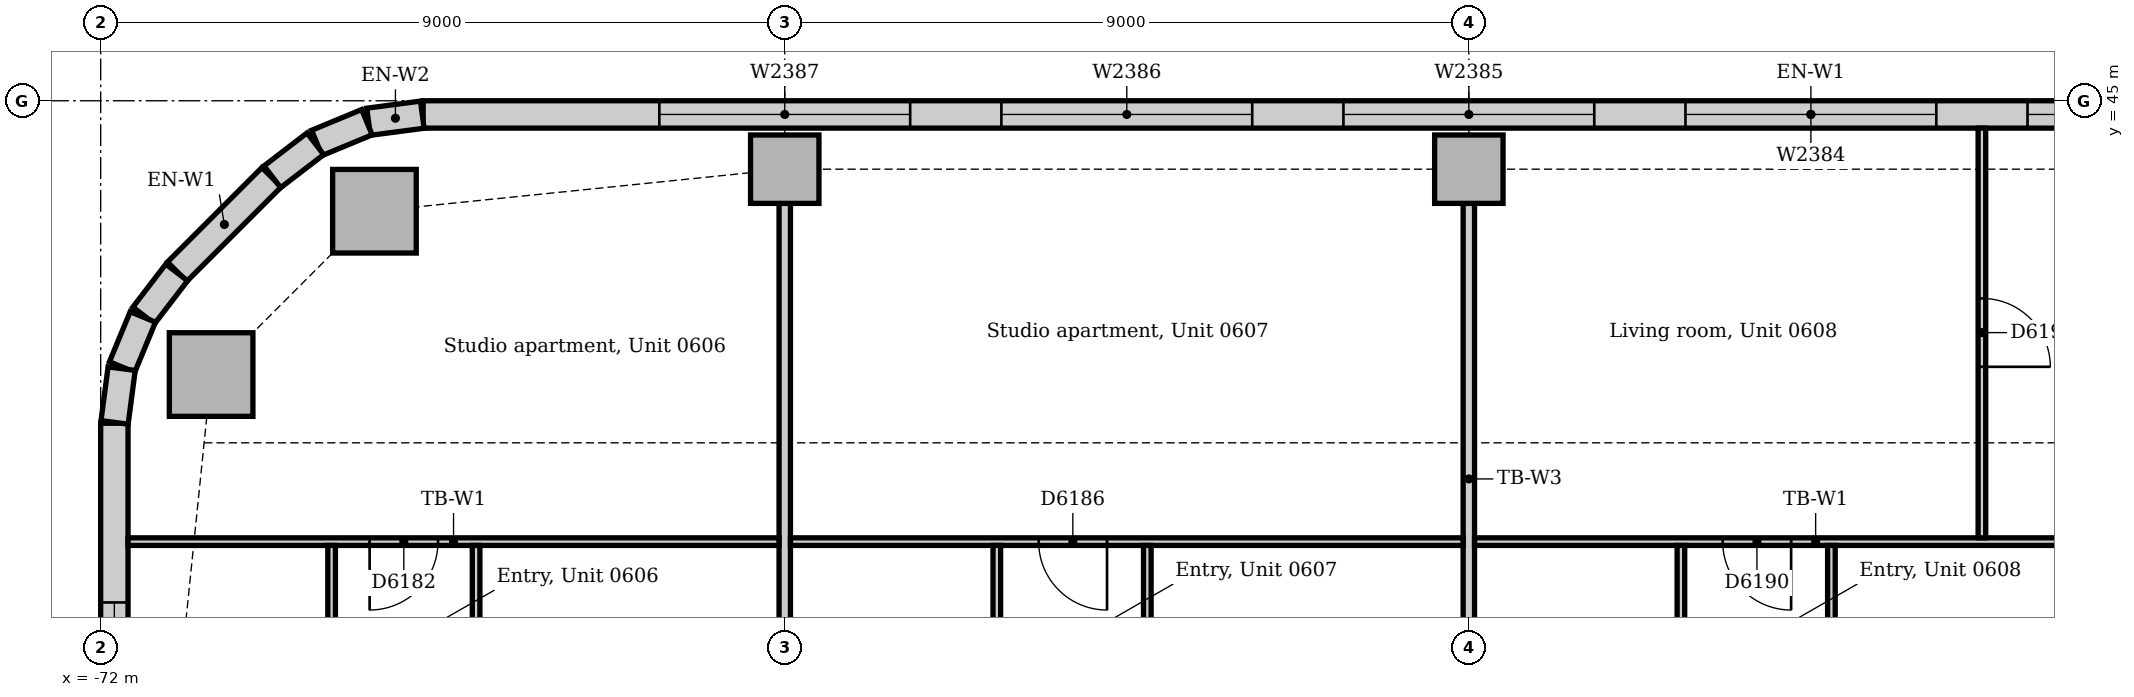
"""IFC4 building model, lengths in metres.
Left out: names, types, materials, properties, quantities, classifications, styles, units other than length and angle.
Written with IfcOpenShell. Run it as: python <this file> out.ifc"""

import sys

from ifc_helpers import new_model, si_unit, direction, frame, frame_2d, origin, origin_2d, place, context, subcontext, project, spatial, rectangle, extrude, element, fill, save


model = new_model("IFC4")
c1 = context("Model", 3, precision=1e-05, world=origin(), true_north=direction((0.0, 1.0)))
c2 = subcontext(c1, "Body", "Model", "MODEL_VIEW")
j1 = project(units=[si_unit("LENGTHUNIT", "METRE"), si_unit("PLANEANGLEUNIT", "RADIAN")], contexts=[c1])
p1 = place(None, origin())
s1 = spatial("IfcSite", under=j1, at=p1, CompositionType="ELEMENT")
p2 = place(p1, origin())
s2 = spatial("IfcBuilding", under=s1, at=p2, CompositionType="ELEMENT")
p3 = place(p2, frame((0.0, 0.0, 30.0)))
s3 = spatial("IfcBuildingStorey", under=s2, at=p3, CompositionType="ELEMENT", Elevation=30.0)
for number, where, z_axis, x_axis in (
    (1, (-68.398, 43.547, 0.0), (0.0, 0.0, 1.0), (1.0, 0.0, 0.0)),
    (2, (-70.547, 41.398, 0.0), (0.0, 0.0, 1.0), (1.0, 0.0, 0.0)),
):
    element("IfcColumn", number, at=place(p3, frame(where, z_axis=z_axis, x_axis=x_axis)), inside=s3, PredefinedType="COLUMN", context=c2, shape_type="SweptSolid", body=[
        extrude(rectangle(XDim=1.1, YDim=1.1, at=origin_2d()), origin(), (0.0, 0.0, 1.0), 3.85),
    ])
for number, where, z_axis, x_axis in (
    (3, (-63.0, 44.1, 0.0), (0.0, 0.0, 1.0), (1.0, 0.0, 0.0)),
    (4, (-54.0, 44.1, 0.0), (0.0, 0.0, 1.0), (1.0, 0.0, 0.0)),
):
    element("IfcColumn", number, at=place(p3, frame(where, z_axis=z_axis, x_axis=x_axis)), inside=s3, PredefinedType="COLUMN", context=c2, shape_type="SweptSolid", body=[
        extrude(rectangle(XDim=0.9, YDim=0.9, at=origin_2d()), origin(), (0.0, 0.0, 1.0), 3.85),
    ])
p4 = place(p3, frame((-31.243, 44.82, 0.0), z_axis=(0.0, 0.0, 1.0), x_axis=(-1.0, 0.0, 0.0)))
e5 = element("IfcWall", 5, at=p4, inside=s3, PredefinedType="STANDARD", context=c2, shape_type="SweptSolid", body=[
    extrude(rectangle(XDim=36.515, YDim=0.36, at=frame_2d((18.257, 0.0))), origin(), (0.0, 0.0, 1.0), 3.85),
])
p5 = place(p4, frame((3.107, 0.0, 0.9)))
e6 = element("IfcOpeningElement", 6, at=p5, cuts=e5, PredefinedType="OPENING", context=c2, shape_type="SweptSolid", body=[
    extrude(rectangle(XDim=3.3, YDim=1.6, at=frame_2d((1.65, 0.8))), frame((0.0, 0.19, 0.0), z_axis=(0.0, -1.0, 0.0), x_axis=(1.0, 0.0, 0.0)), (0.0, 0.0, 1.0), 0.38),
])
p6 = place(p4, frame((7.607, 0.0, 0.9)))
e7 = element("IfcOpeningElement", 7, at=p6, cuts=e5, PredefinedType="OPENING", context=c2, shape_type="SweptSolid", body=[
    extrude(rectangle(XDim=3.3, YDim=1.6, at=frame_2d((1.65, 0.8))), frame((0.0, 0.19, 0.0), z_axis=(0.0, -1.0, 0.0), x_axis=(1.0, 0.0, 0.0)), (0.0, 0.0, 1.0), 0.38),
])
p7 = place(p4, frame((12.107, 0.0, 0.9)))
e8 = element("IfcOpeningElement", 8, at=p7, cuts=e5, PredefinedType="OPENING", context=c2, shape_type="SweptSolid", body=[
    extrude(rectangle(XDim=3.3, YDim=1.6, at=frame_2d((1.65, 0.8))), frame((0.0, 0.19, 0.0), z_axis=(0.0, -1.0, 0.0), x_axis=(1.0, 0.0, 0.0)), (0.0, 0.0, 1.0), 0.38),
])
p8 = place(p4, frame((16.607, 0.0, 0.9)))
e9 = element("IfcOpeningElement", 9, at=p8, cuts=e5, PredefinedType="OPENING", context=c2, shape_type="SweptSolid", body=[
    extrude(rectangle(XDim=3.3, YDim=1.6, at=frame_2d((1.65, 0.8))), frame((0.0, 0.19, 0.0), z_axis=(0.0, -1.0, 0.0), x_axis=(1.0, 0.0, 0.0)), (0.0, 0.0, 1.0), 0.38),
])
p9 = place(p4, frame((21.107, 0.0, 0.9)))
e10 = element("IfcOpeningElement", 10, at=p9, cuts=e5, PredefinedType="OPENING", context=c2, shape_type="SweptSolid", body=[
    extrude(rectangle(XDim=3.3, YDim=1.6, at=frame_2d((1.65, 0.8))), frame((0.0, 0.19, 0.0), z_axis=(0.0, -1.0, 0.0), x_axis=(1.0, 0.0, 0.0)), (0.0, 0.0, 1.0), 0.38),
])
p10 = place(p4, frame((25.607, 0.0, 0.9)))
e11 = element("IfcOpeningElement", 11, at=p10, cuts=e5, PredefinedType="OPENING", context=c2, shape_type="SweptSolid", body=[
    extrude(rectangle(XDim=3.3, YDim=1.6, at=frame_2d((1.65, 0.8))), frame((0.0, 0.19, 0.0), z_axis=(0.0, -1.0, 0.0), x_axis=(1.0, 0.0, 0.0)), (0.0, 0.0, 1.0), 0.38),
])
p11 = place(p4, frame((30.107, 0.0, 0.9)))
e12 = element("IfcOpeningElement", 12, at=p11, cuts=e5, PredefinedType="OPENING", context=c2, shape_type="SweptSolid", body=[
    extrude(rectangle(XDim=3.3, YDim=1.6, at=frame_2d((1.65, 0.8))), frame((0.0, 0.19, 0.0), z_axis=(0.0, -1.0, 0.0), x_axis=(1.0, 0.0, 0.0)), (0.0, 0.0, 1.0), 0.38),
])
p12 = place(p3, frame((-69.751, 43.994, 0.0), z_axis=(0.0, 0.0, 1.0), x_axis=(-0.707106781187, -0.707106781187, 0.0)))
e13 = element("IfcWall", 13, at=p12, inside=s3, PredefinedType="STANDARD", context=c2, shape_type="SweptSolid", body=[
    extrude(rectangle(XDim=1.757, YDim=0.36, at=frame_2d((0.879, 0.0))), origin(), (0.0, 0.0, 1.0), 3.85),
])
p13 = place(p3, frame((-71.82, 40.757, 0.0), z_axis=(0.0, 0.0, 1.0), x_axis=(0.0, -1.0, 0.0)))
e14 = element("IfcWall", 14, at=p13, inside=s3, PredefinedType="STANDARD", context=c2, shape_type="SweptSolid", body=[
    extrude(rectangle(XDim=26.015, YDim=0.36, at=frame_2d((13.007, 0.0))), origin(), (0.0, 0.0, 1.0), 3.85),
])
p14 = place(p13, frame((2.357, 0.0, 0.9)))
e15 = element("IfcOpeningElement", 15, at=p14, cuts=e14, PredefinedType="OPENING", context=c2, shape_type="SweptSolid", body=[
    extrude(rectangle(XDim=3.3, YDim=1.6, at=frame_2d((1.65, 0.8))), frame((0.0, 0.19, 0.0), z_axis=(0.0, -1.0, 0.0), x_axis=(1.0, 0.0, 0.0)), (0.0, 0.0, 1.0), 0.38),
])
p15 = place(p13, frame((7.057, 0.0, 0.9)))
e16 = element("IfcOpeningElement", 16, at=p15, cuts=e14, PredefinedType="OPENING", context=c2, shape_type="SweptSolid", body=[
    extrude(rectangle(XDim=3.3, YDim=1.6, at=frame_2d((1.65, 0.8))), frame((0.0, 0.19, 0.0), z_axis=(0.0, -1.0, 0.0), x_axis=(1.0, 0.0, 0.0)), (0.0, 0.0, 1.0), 0.38),
])
p16 = place(p13, frame((11.357, 0.0, 0.9)))
e17 = element("IfcOpeningElement", 17, at=p16, cuts=e14, PredefinedType="OPENING", context=c2, shape_type="SweptSolid", body=[
    extrude(rectangle(XDim=3.3, YDim=1.6, at=frame_2d((1.65, 0.8))), frame((0.0, 0.19, 0.0), z_axis=(0.0, -1.0, 0.0), x_axis=(1.0, 0.0, 0.0)), (0.0, 0.0, 1.0), 0.38),
])
p17 = place(p13, frame((15.857, 0.0, 0.9)))
e18 = element("IfcOpeningElement", 18, at=p17, cuts=e14, PredefinedType="OPENING", context=c2, shape_type="SweptSolid", body=[
    extrude(rectangle(XDim=3.3, YDim=1.6, at=frame_2d((1.65, 0.8))), frame((0.0, 0.19, 0.0), z_axis=(0.0, -1.0, 0.0), x_axis=(1.0, 0.0, 0.0)), (0.0, 0.0, 1.0), 0.38),
])
p18 = place(p13, frame((20.957, 0.0, 0.9)))
e19 = element("IfcOpeningElement", 19, at=p18, cuts=e14, PredefinedType="OPENING", context=c2, shape_type="SweptSolid", body=[
    extrude(rectangle(XDim=3.3, YDim=1.6, at=frame_2d((1.65, 0.8))), frame((0.0, 0.19, 0.0), z_axis=(0.0, -1.0, 0.0), x_axis=(1.0, 0.0, 0.0)), (0.0, 0.0, 1.0), 0.38),
])
for number, where, z_axis, x_axis in (
    (20, (-67.769, 44.817, 0.0), (0.0, 0.0, 1.0), (-0.991, -0.131, 0.0)),
    (21, (-68.497, 44.718, 0.0), (0.0, 0.0, 1.0), (-0.924, -0.383, 0.0)),
):
    element("IfcWall", number, at=place(p3, frame(where, z_axis=z_axis, x_axis=x_axis)), inside=s3, PredefinedType="STANDARD", context=c2, shape_type="SweptSolid", body=[
        extrude(rectangle(XDim=0.713, YDim=0.36, at=frame_2d((0.356, 0.0))), origin(), (0.0, 0.0, 1.0), 3.85),
    ])
for number, where, z_axis, x_axis in (
    (22, (-69.175, 44.434, 0.0), (0.0, 0.0, 1.0), (-0.793, -0.609, 0.0)),
    (23, (-71.0, 42.741, 0.0), (0.0, 0.0, 1.0), (-0.609, -0.793, 0.0)),
):
    element("IfcWall", number, at=place(p3, frame(where, z_axis=z_axis, x_axis=x_axis)), inside=s3, PredefinedType="STANDARD", context=c2, shape_type="SweptSolid", body=[
        extrude(rectangle(XDim=0.713, YDim=0.36, at=frame_2d((0.357, 0.0))), origin(), (0.0, 0.0, 1.0), 3.85),
    ])
for number, where, z_axis, x_axis in (
    (24, (-71.445, 42.156, 0.0), (0.0, 0.0, 1.0), (-0.383, -0.924, 0.0)),
    (25, (-71.724, 41.476, 0.0), (0.0, 0.0, 1.0), (-0.131, -0.991, 0.0)),
):
    element("IfcWall", number, at=place(p3, frame(where, z_axis=z_axis, x_axis=x_axis)), inside=s3, PredefinedType="STANDARD", context=c2, shape_type="SweptSolid", body=[
        extrude(rectangle(XDim=0.713, YDim=0.36, at=frame_2d((0.356, 0.0))), origin(), (0.0, 0.0, 1.0), 3.85),
    ])
for number, where, z_axis, x_axis in (
    (26, (-63.0, 36.4, 0.0), (0.0, 0.0, 1.0), (0.0, 1.0, 0.0)),
    (27, (-54.0, 36.4, 0.0), (0.0, 0.0, 1.0), (0.0, 1.0, 0.0)),
):
    element("IfcWall", number, at=place(p3, frame(where, z_axis=z_axis, x_axis=x_axis)), inside=s3, PredefinedType="PARTITIONING", context=c2, shape_type="SweptSolid", body=[
        extrude(rectangle(XDim=7.25, YDim=0.15, at=frame_2d((3.625, 0.0))), origin(), (0.0, 0.0, 1.0), 3.158),
    ])
p19 = place(p3, frame((-53.925, 39.2, 0.0), z_axis=(0.0, 0.0, 1.0), x_axis=(1.0, 0.0, 0.0)))
e28 = element("IfcWall", 28, at=p19, inside=s3, PredefinedType="PARTITIONING", context=c2, shape_type="SweptSolid", body=[
    extrude(rectangle(XDim=8.975, YDim=0.1, at=frame_2d((4.487, 0.0))), origin(), (0.0, 0.0, 1.0), 3.85),
])
p20 = place(p19, frame((3.265, 0.0, 0.0)))
e29 = element("IfcOpeningElement", 29, at=p20, cuts=e28, PredefinedType="OPENING", context=c2, shape_type="SweptSolid", body=[
    extrude(rectangle(XDim=0.9, YDim=2.1, at=frame_2d((0.45, 1.05))), frame((0.0, 0.06, 0.0), z_axis=(0.0, -1.0, 0.0), x_axis=(1.0, 0.0, 0.0)), (0.0, 0.0, 1.0), 0.12),
])
p21 = place(p3, frame((-62.925, 39.2, 0.0), z_axis=(0.0, 0.0, 1.0), x_axis=(1.0, 0.0, 0.0)))
e30 = element("IfcWall", 30, at=p21, inside=s3, PredefinedType="PARTITIONING", context=c2, shape_type="SweptSolid", body=[
    extrude(rectangle(XDim=8.85, YDim=0.1, at=frame_2d((4.425, 0.0))), origin(), (0.0, 0.0, 1.0), 3.85),
])
p22 = place(p21, frame((3.265, 0.0, 0.0)))
e31 = element("IfcOpeningElement", 31, at=p22, cuts=e30, PredefinedType="OPENING", context=c2, shape_type="SweptSolid", body=[
    extrude(rectangle(XDim=0.9, YDim=2.1, at=frame_2d((0.45, 1.05))), frame((0.0, 0.06, 0.0), z_axis=(0.0, -1.0, 0.0), x_axis=(1.0, 0.0, 0.0)), (0.0, 0.0, 1.0), 0.12),
])
p23 = place(p3, frame((-71.64, 39.2, 0.0), z_axis=(0.0, 0.0, 1.0), x_axis=(1.0, 0.0, 0.0)))
e32 = element("IfcWall", 32, at=p23, inside=s3, PredefinedType="PARTITIONING", context=c2, shape_type="SweptSolid", body=[
    extrude(rectangle(XDim=8.565, YDim=0.1, at=frame_2d((4.282, 0.0))), origin(), (0.0, 0.0, 1.0), 3.85),
])
p24 = place(p23, frame((3.178, 0.0, 0.0)))
e33 = element("IfcOpeningElement", 33, at=p24, cuts=e32, PredefinedType="OPENING", context=c2, shape_type="SweptSolid", body=[
    extrude(rectangle(XDim=0.9, YDim=2.1, at=frame_2d((0.45, 1.05))), frame((0.0, 0.06, 0.0), z_axis=(0.0, -1.0, 0.0), x_axis=(1.0, 0.0, 0.0)), (0.0, 0.0, 1.0), 0.12),
])
p25 = place(p3, frame((-47.25, 39.25, 0.0), z_axis=(0.0, 0.0, 1.0), x_axis=(0.0, 1.0, 0.0)))
e34 = element("IfcWall", 34, at=p25, inside=s3, PredefinedType="PARTITIONING", context=c2, shape_type="SweptSolid", body=[
    extrude(rectangle(XDim=5.39, YDim=0.1, at=frame_2d((2.695, 0.0))), origin(), (0.0, 0.0, 1.0), 3.85),
])
p26 = place(p25, frame((2.25, 0.0, 0.0)))
e35 = element("IfcOpeningElement", 35, at=p26, cuts=e34, PredefinedType="OPENING", context=c2, shape_type="SweptSolid", body=[
    extrude(rectangle(XDim=0.9, YDim=2.1, at=frame_2d((0.45, 1.05))), frame((0.0, 0.06, 0.0), z_axis=(0.0, -1.0, 0.0), x_axis=(1.0, 0.0, 0.0)), (0.0, 0.0, 1.0), 0.12),
])
p27 = place(p3, frame((-68.962, 36.075, 0.0), z_axis=(0.0, 0.0, 1.0), x_axis=(0.0, 1.0, 0.0)))
e36 = element("IfcWall", 36, at=p27, inside=s3, PredefinedType="PARTITIONING", context=c2, shape_type="SweptSolid", body=[
    extrude(rectangle(XDim=3.075, YDim=0.1, at=frame_2d((1.538, 0.0))), origin(), (0.0, 0.0, 1.0), 3.85),
])
p28 = place(p27, frame((1.1, 0.0, 0.0)))
e37 = element("IfcOpeningElement", 37, at=p28, cuts=e36, PredefinedType="OPENING", context=c2, shape_type="SweptSolid", body=[
    extrude(rectangle(XDim=0.9, YDim=2.1, at=frame_2d((0.45, 1.05))), frame((0.0, 0.06, 0.0), z_axis=(0.0, -1.0, 0.0), x_axis=(1.0, 0.0, 0.0)), (0.0, 0.0, 1.0), 0.12),
])
p29 = place(p3, frame((-67.061, 36.075, 0.0), z_axis=(0.0, 0.0, 1.0), x_axis=(0.0, 1.0, 0.0)))
e38 = element("IfcWall", 38, at=p29, inside=s3, PredefinedType="PARTITIONING", context=c2, shape_type="SweptSolid", body=[
    extrude(rectangle(XDim=3.075, YDim=0.1, at=frame_2d((1.538, 0.0))), origin(), (0.0, 0.0, 1.0), 3.85),
])
p30 = place(p29, frame((1.1, 0.0, 0.0)))
e39 = element("IfcOpeningElement", 39, at=p30, cuts=e38, PredefinedType="OPENING", context=c2, shape_type="SweptSolid", body=[
    extrude(rectangle(XDim=0.9, YDim=2.1, at=frame_2d((0.45, 1.05))), frame((0.0, 0.06, 0.0), z_axis=(0.0, -1.0, 0.0), x_axis=(1.0, 0.0, 0.0)), (0.0, 0.0, 1.0), 0.12),
])
p31 = place(p3, frame((-60.21, 36.075, 0.0), z_axis=(0.0, 0.0, 1.0), x_axis=(0.0, 1.0, 0.0)))
e40 = element("IfcWall", 40, at=p31, inside=s3, PredefinedType="PARTITIONING", context=c2, shape_type="SweptSolid", body=[
    extrude(rectangle(XDim=3.075, YDim=0.1, at=frame_2d((1.538, 0.0))), origin(), (0.0, 0.0, 1.0), 3.85),
])
p32 = place(p31, frame((1.1, 0.0, 0.0)))
e41 = element("IfcOpeningElement", 41, at=p32, cuts=e40, PredefinedType="OPENING", context=c2, shape_type="SweptSolid", body=[
    extrude(rectangle(XDim=0.9, YDim=2.1, at=frame_2d((0.45, 1.05))), frame((0.0, 0.06, 0.0), z_axis=(0.0, -1.0, 0.0), x_axis=(1.0, 0.0, 0.0)), (0.0, 0.0, 1.0), 0.12),
])
p33 = place(p3, frame((-58.23, 36.075, 0.0), z_axis=(0.0, 0.0, 1.0), x_axis=(0.0, 1.0, 0.0)))
e42 = element("IfcWall", 42, at=p33, inside=s3, PredefinedType="PARTITIONING", context=c2, shape_type="SweptSolid", body=[
    extrude(rectangle(XDim=3.075, YDim=0.1, at=frame_2d((1.538, 0.0))), origin(), (0.0, 0.0, 1.0), 3.85),
])
p34 = place(p33, frame((1.1, 0.0, 0.0)))
e43 = element("IfcOpeningElement", 43, at=p34, cuts=e42, PredefinedType="OPENING", context=c2, shape_type="SweptSolid", body=[
    extrude(rectangle(XDim=0.9, YDim=2.1, at=frame_2d((0.45, 1.05))), frame((0.0, 0.06, 0.0), z_axis=(0.0, -1.0, 0.0), x_axis=(1.0, 0.0, 0.0)), (0.0, 0.0, 1.0), 0.12),
])
p35 = place(p3, frame((-51.21, 36.075, 0.0), z_axis=(0.0, 0.0, 1.0), x_axis=(0.0, 1.0, 0.0)))
e44 = element("IfcWall", 44, at=p35, inside=s3, PredefinedType="PARTITIONING", context=c2, shape_type="SweptSolid", body=[
    extrude(rectangle(XDim=3.075, YDim=0.1, at=frame_2d((1.538, 0.0))), origin(), (0.0, 0.0, 1.0), 3.85),
])
p36 = place(p35, frame((1.1, 0.0, 0.0)))
e45 = element("IfcOpeningElement", 45, at=p36, cuts=e44, PredefinedType="OPENING", context=c2, shape_type="SweptSolid", body=[
    extrude(rectangle(XDim=0.9, YDim=2.1, at=frame_2d((0.45, 1.05))), frame((0.0, 0.06, 0.0), z_axis=(0.0, -1.0, 0.0), x_axis=(1.0, 0.0, 0.0)), (0.0, 0.0, 1.0), 0.12),
])
p37 = place(p3, frame((-49.23, 36.075, 0.0), z_axis=(0.0, 0.0, 1.0), x_axis=(0.0, 1.0, 0.0)))
e46 = element("IfcWall", 46, at=p37, inside=s3, PredefinedType="PARTITIONING", context=c2, shape_type="SweptSolid", body=[
    extrude(rectangle(XDim=3.075, YDim=0.1, at=frame_2d((1.538, 0.0))), origin(), (0.0, 0.0, 1.0), 3.85),
])
p38 = place(p37, frame((1.1, 0.0, 0.0)))
e47 = element("IfcOpeningElement", 47, at=p38, cuts=e46, PredefinedType="OPENING", context=c2, shape_type="SweptSolid", body=[
    extrude(rectangle(XDim=0.9, YDim=2.1, at=frame_2d((0.45, 1.05))), frame((0.0, 0.06, 0.0), z_axis=(0.0, -1.0, 0.0), x_axis=(1.0, 0.0, 0.0)), (0.0, 0.0, 1.0), 0.12),
])
p39 = place(p7, origin())
e48 = element("IfcWindow", 48, at=p39, inside=s3, PartitioningType="SINGLE_PANEL", PredefinedType="WINDOW", context=c2, shape_type="SweptSolid", body=[
    extrude(rectangle(XDim=3.3, YDim=1.6, at=frame_2d((1.65, 0.8))), frame((0.0, 0.13, 0.0), z_axis=(0.0, -1.0, 0.0), x_axis=(1.0, 0.0, 0.0)), (0.0, 0.0, 1.0), 0.06),
])
fill(e8, e48)
p40 = place(p8, origin())
e49 = element("IfcWindow", 49, at=p40, inside=s3, PartitioningType="SINGLE_PANEL", PredefinedType="WINDOW", context=c2, shape_type="SweptSolid", body=[
    extrude(rectangle(XDim=3.3, YDim=1.6, at=frame_2d((1.65, 0.8))), frame((0.0, 0.13, 0.0), z_axis=(0.0, -1.0, 0.0), x_axis=(1.0, 0.0, 0.0)), (0.0, 0.0, 1.0), 0.06),
])
fill(e9, e49)
p41 = place(p9, origin())
e50 = element("IfcWindow", 50, at=p41, inside=s3, PartitioningType="SINGLE_PANEL", PredefinedType="WINDOW", context=c2, shape_type="SweptSolid", body=[
    extrude(rectangle(XDim=3.3, YDim=1.6, at=frame_2d((1.65, 0.8))), frame((0.0, 0.13, 0.0), z_axis=(0.0, -1.0, 0.0), x_axis=(1.0, 0.0, 0.0)), (0.0, 0.0, 1.0), 0.06),
])
fill(e10, e50)
p42 = place(p10, origin())
e51 = element("IfcWindow", 51, at=p42, inside=s3, PartitioningType="SINGLE_PANEL", PredefinedType="WINDOW", context=c2, shape_type="SweptSolid", body=[
    extrude(rectangle(XDim=3.3, YDim=1.6, at=frame_2d((1.65, 0.8))), frame((0.0, 0.13, 0.0), z_axis=(0.0, -1.0, 0.0), x_axis=(1.0, 0.0, 0.0)), (0.0, 0.0, 1.0), 0.06),
])
fill(e11, e51)
p43 = place(p11, origin())
e52 = element("IfcWindow", 52, at=p43, inside=s3, PartitioningType="SINGLE_PANEL", PredefinedType="WINDOW", context=c2, shape_type="SweptSolid", body=[
    extrude(rectangle(XDim=3.3, YDim=1.6, at=frame_2d((1.65, 0.8))), frame((0.0, 0.13, 0.0), z_axis=(0.0, -1.0, 0.0), x_axis=(1.0, 0.0, 0.0)), (0.0, 0.0, 1.0), 0.06),
])
fill(e12, e52)
p44 = place(p14, origin())
e53 = element("IfcWindow", 53, at=p44, inside=s3, PartitioningType="SINGLE_PANEL", PredefinedType="WINDOW", context=c2, shape_type="SweptSolid", body=[
    extrude(rectangle(XDim=3.3, YDim=1.6, at=frame_2d((1.65, 0.8))), frame((0.0, 0.13, 0.0), z_axis=(0.0, -1.0, 0.0), x_axis=(1.0, 0.0, 0.0)), (0.0, 0.0, 1.0), 0.06),
])
fill(e15, e53)
p45 = place(p24, frame((0.9, 0.0, 0.0), z_axis=(0.0, 0.0, 1.0), x_axis=(-1.0, 0.0, 0.0)))
e54 = element("IfcDoor", 54, at=p45, inside=s3, OperationType="SINGLE_SWING_RIGHT", PredefinedType="DOOR", context=c2, shape_type="SweptSolid", body=[
    extrude(rectangle(XDim=0.9, YDim=2.1, at=frame_2d((0.45, 1.05))), frame((0.0, 0.025, 0.0), z_axis=(0.0, -1.0, 0.0), x_axis=(1.0, 0.0, 0.0)), (0.0, 0.0, 1.0), 0.05),
])
fill(e33, e54)
p46 = place(p22, frame((0.9, 0.0, 0.0), z_axis=(0.0, 0.0, 1.0), x_axis=(-1.0, 0.0, 0.0)))
e55 = element("IfcDoor", 55, at=p46, inside=s3, OperationType="SINGLE_SWING_LEFT", PredefinedType="DOOR", context=c2, shape_type="SweptSolid", body=[
    extrude(rectangle(XDim=0.9, YDim=2.1, at=frame_2d((0.45, 1.05))), frame((0.0, 0.025, 0.0), z_axis=(0.0, -1.0, 0.0), x_axis=(1.0, 0.0, 0.0)), (0.0, 0.0, 1.0), 0.05),
])
fill(e31, e55)
p47 = place(p20, frame((0.9, 0.0, 0.0), z_axis=(0.0, 0.0, 1.0), x_axis=(-1.0, 0.0, 0.0)))
e56 = element("IfcDoor", 56, at=p47, inside=s3, OperationType="SINGLE_SWING_LEFT", PredefinedType="DOOR", context=c2, shape_type="SweptSolid", body=[
    extrude(rectangle(XDim=0.9, YDim=2.1, at=frame_2d((0.45, 1.05))), frame((0.0, 0.025, 0.0), z_axis=(0.0, -1.0, 0.0), x_axis=(1.0, 0.0, 0.0)), (0.0, 0.0, 1.0), 0.05),
])
fill(e29, e56)
p48 = place(p26, frame((0.9, 0.0, 0.0), z_axis=(0.0, 0.0, 1.0), x_axis=(-1.0, 0.0, 0.0)))
e57 = element("IfcDoor", 57, at=p48, inside=s3, OperationType="SINGLE_SWING_RIGHT", PredefinedType="DOOR", context=c2, shape_type="SweptSolid", body=[
    extrude(rectangle(XDim=0.9, YDim=2.1, at=frame_2d((0.45, 1.05))), frame((0.0, 0.025, 0.0), z_axis=(0.0, -1.0, 0.0), x_axis=(1.0, 0.0, 0.0)), (0.0, 0.0, 1.0), 0.05),
])
fill(e35, e57)
save(model, sys.argv[1])
